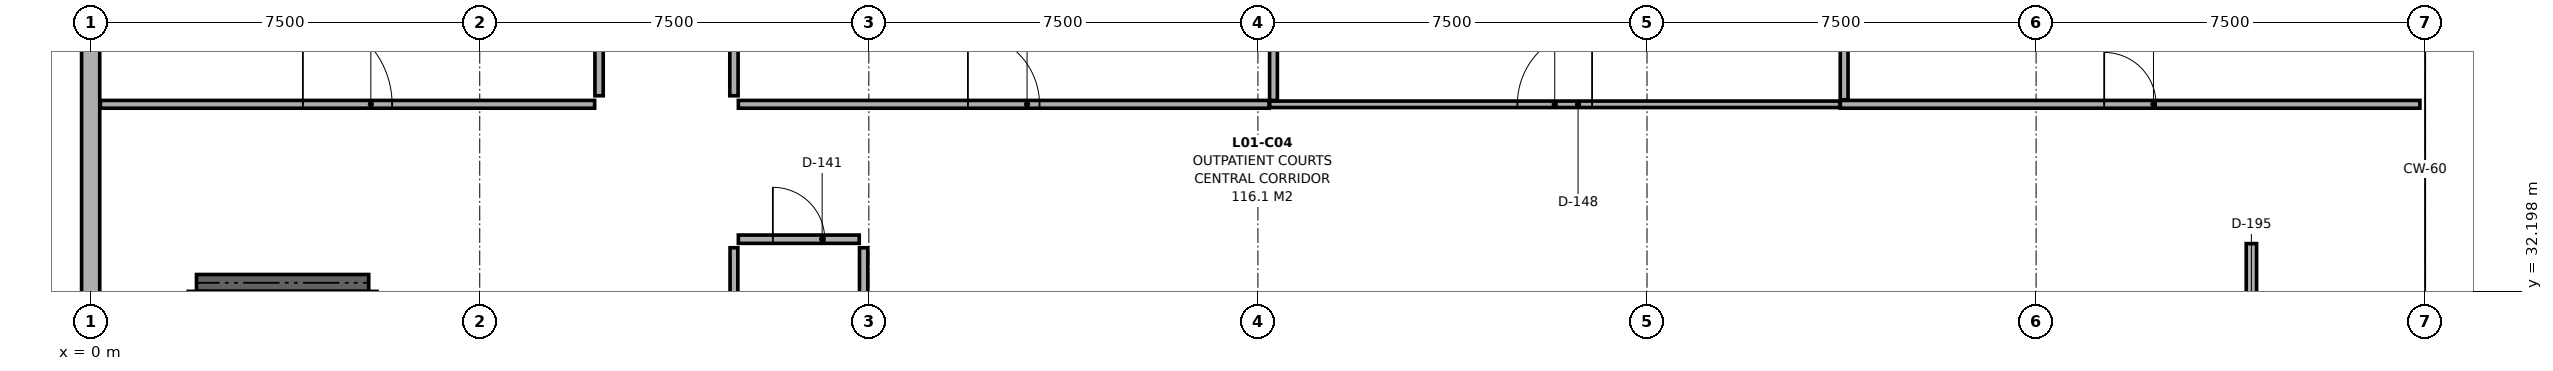
"""IFC4 building model, lengths in metres.
Left out: names, types, materials, properties, quantities, classifications, styles, units other than length and angle.
Written with IfcOpenShell. Run it as: python <this file> out.ifc"""

import sys

from ifc_helpers import new_model, si_unit, direction, frame, frame_2d, origin, place, context, subcontext, project, spatial, rectangle, extrude, element, fill, save


model = new_model("IFC4")
c1 = context("Model", 3, precision=1e-05, world=origin(), true_north=direction((0.0, 1.0)))
c2 = subcontext(c1, "Body", "Model", "MODEL_VIEW")
j1 = project(units=[si_unit("LENGTHUNIT", "METRE"), si_unit("PLANEANGLEUNIT", "RADIAN")], contexts=[c1])
p1 = place(None, origin())
s1 = spatial("IfcSite", under=j1, at=p1, CompositionType="ELEMENT")
p2 = place(p1, origin())
s2 = spatial("IfcBuilding", under=s1, at=p2, CompositionType="ELEMENT")
p3 = place(p2, frame((0.0, 0.0, 5.0)))
s3 = spatial("IfcBuildingStorey", under=s2, at=p3, CompositionType="ELEMENT", Elevation=5.0)
p4 = place(p3, frame((0.0, 31.15, 0.0), z_axis=(0.0, 0.0, 1.0), x_axis=(0.0, 1.0, 0.0)))
e1 = element("IfcWall", 1, at=p4, inside=s3, PredefinedType="SOLIDWALL", context=c2, shape_type="SweptSolid", body=[
    extrude(rectangle(XDim=6.8, YDim=0.35, at=frame_2d((3.4, 0.0))), origin(), (0.0, 0.0, 1.0), 3.535),
])
p5 = place(p3, frame((5.36, 32.36, 0.0), z_axis=(0.0, 0.0, 1.0), x_axis=(-1.0, 0.0, 0.0)))
e2 = element("IfcWall", 2, at=p5, inside=s3, PredefinedType="SHEAR", context=c2, shape_type="SweptSolid", body=[
    extrude(rectangle(XDim=3.32, YDim=0.32, at=frame_2d((1.66, 0.0))), origin(), (0.0, 0.0, 1.0), 4.2),
])
p6 = place(p3, frame((0.187, 35.8, 0.0), z_axis=(0.0, 0.0, 1.0), x_axis=(1.0, 0.0, 0.0)))
e3 = element("IfcWall", 3, at=p6, inside=s3, PredefinedType="PARTITIONING", context=c2, shape_type="SweptSolid", body=[
    extrude(rectangle(XDim=9.528, YDim=0.15, at=frame_2d((4.764, 0.0))), origin(), (0.0, 0.0, 1.0), 3.265),
])
p7 = place(p6, frame((3.904, 0.0, 0.0)))
e4 = element("IfcOpeningElement", 4, at=p7, cuts=e3, PredefinedType="OPENING", context=c2, shape_type="SweptSolid", body=[
    extrude(rectangle(XDim=1.72, YDim=2.34, at=frame_2d((0.86, 1.17))), frame((0.0, 0.087, 0.0), z_axis=(0.0, -1.0, 0.0), x_axis=(1.0, 0.0, 0.0)), (0.0, 0.0, 1.0), 0.174),
])
p8 = place(p3, frame((12.485, 35.8, 0.0), z_axis=(0.0, 0.0, 1.0), x_axis=(1.0, 0.0, 0.0)))
e5 = element("IfcWall", 5, at=p8, inside=s3, PredefinedType="PARTITIONING", context=c2, shape_type="SweptSolid", body=[
    extrude(rectangle(XDim=10.23, YDim=0.15, at=frame_2d((5.115, 0.0))), origin(), (0.0, 0.0, 1.0), 3.265),
])
p9 = place(p8, frame((4.425, 0.0, 0.0)))
e6 = element("IfcOpeningElement", 6, at=p9, cuts=e5, PredefinedType="OPENING", context=c2, shape_type="SweptSolid", body=[
    extrude(rectangle(XDim=1.38, YDim=2.3, at=frame_2d((0.69, 1.15))), frame((0.0, 0.087, 0.0), z_axis=(0.0, -1.0, 0.0), x_axis=(1.0, 0.0, 0.0)), (0.0, 0.0, 1.0), 0.174),
])
p10 = place(p3, frame((22.727, 35.8, 0.0), z_axis=(0.0, 0.0, 1.0), x_axis=(1.0, 0.0, 0.0)))
e7 = element("IfcWall", 7, at=p10, inside=s3, PredefinedType="PARTITIONING", context=c2, shape_type="SweptSolid", body=[
    extrude(rectangle(XDim=10.988, YDim=0.125, at=frame_2d((5.494, 0.0))), origin(), (0.0, 0.0, 1.0), 3.265),
])
p11 = place(p10, frame((4.774, 0.0, 0.0)))
e8 = element("IfcOpeningElement", 8, at=p11, cuts=e7, PredefinedType="OPENING", context=c2, shape_type="SweptSolid", body=[
    extrude(rectangle(XDim=1.44, YDim=2.32, at=frame_2d((0.72, 1.16))), frame((0.0, 0.074, 0.0), z_axis=(0.0, -1.0, 0.0), x_axis=(1.0, 0.0, 0.0)), (0.0, 0.0, 1.0), 0.149),
])
p12 = place(p3, frame((33.727, 35.8, 0.0), z_axis=(0.0, 0.0, 1.0), x_axis=(1.0, 0.0, 0.0)))
e9 = element("IfcWall", 9, at=p12, inside=s3, PredefinedType="PARTITIONING", context=c2, shape_type="SweptSolid", body=[
    extrude(rectangle(XDim=11.171, YDim=0.15, at=frame_2d((5.585, 0.0))), origin(), (0.0, 0.0, 1.0), 3.485),
])
p13 = place(p12, frame((5.085, 0.0, 0.0)))
e10 = element("IfcOpeningElement", 10, at=p13, cuts=e9, PredefinedType="OPENING", context=c2, shape_type="SweptSolid", body=[
    extrude(rectangle(XDim=1.0, YDim=2.15, at=frame_2d((0.5, 1.075))), frame((0.0, 0.087, 0.0), z_axis=(0.0, -1.0, 0.0), x_axis=(1.0, 0.0, 0.0)), (0.0, 0.0, 1.0), 0.174),
])
p14 = place(p3, frame((12.485, 33.2, 0.0), z_axis=(0.0, 0.0, 1.0), x_axis=(1.0, 0.0, 0.0)))
e11 = element("IfcWall", 11, at=p14, inside=s3, PredefinedType="PARTITIONING", context=c2, shape_type="SweptSolid", body=[
    extrude(rectangle(XDim=2.33, YDim=0.16, at=frame_2d((1.165, 0.0))), origin(), (0.0, 0.0, 1.0), 3.265),
])
p15 = place(p14, frame((0.665, 0.0, 0.0)))
e12 = element("IfcOpeningElement", 12, at=p15, cuts=e11, PredefinedType="OPENING", context=c2, shape_type="SweptSolid", body=[
    extrude(rectangle(XDim=1.0, YDim=2.22, at=frame_2d((0.5, 1.11))), frame((0.0, 0.092, 0.0), z_axis=(0.0, -1.0, 0.0), x_axis=(1.0, 0.0, 0.0)), (0.0, 0.0, 1.0), 0.184),
])
p16 = place(p3, frame((41.65, 27.735, 0.0), z_axis=(0.0, 0.0, 1.0), x_axis=(0.0, 1.0, 0.0)))
e13 = element("IfcWall", 13, at=p16, inside=s3, PredefinedType="PARTITIONING", context=c2, shape_type="SweptSolid", body=[
    extrude(rectangle(XDim=5.38, YDim=0.2, at=frame_2d((2.69, 0.0))), origin(), (0.0, 0.0, 1.0), 3.485),
])
p17 = place(p16, frame((1.79, 0.0, 0.0)))
e14 = element("IfcOpeningElement", 14, at=p17, cuts=e13, PredefinedType="OPENING", context=c2, shape_type="SweptSolid", body=[
    extrude(rectangle(XDim=1.8, YDim=2.15, at=frame_2d((0.9, 1.075))), frame((0.0, 0.112, 0.0), z_axis=(0.0, -1.0, 0.0), x_axis=(1.0, 0.0, 0.0)), (0.0, 0.0, 1.0), 0.224),
])
p18 = place(p3, frame((9.8, 35.965, 0.0), z_axis=(0.0, 0.0, 1.0), x_axis=(0.0, 1.0, 0.0)))
e15 = element("IfcWall", 15, at=p18, inside=s3, PredefinedType="PARTITIONING", context=c2, shape_type="SweptSolid", body=[
    extrude(rectangle(XDim=9.908, YDim=0.16, at=frame_2d((4.954, 0.0))), origin(), (0.0, 0.0, 1.0), 3.265),
])
p19 = place(p3, frame((12.4, 35.965, 0.0), z_axis=(0.0, 0.0, 1.0), x_axis=(0.0, 1.0, 0.0)))
e16 = element("IfcWall", 16, at=p19, inside=s3, PredefinedType="PARTITIONING", context=c2, shape_type="SweptSolid", body=[
    extrude(rectangle(XDim=9.59, YDim=0.16, at=frame_2d((4.795, 0.0))), origin(), (0.0, 0.0, 1.0), 3.265),
])
p20 = place(p3, frame((22.8, 35.875, 0.0), z_axis=(0.0, 0.0, 1.0), x_axis=(0.0, 1.0, 0.0)))
e17 = element("IfcWall", 17, at=p20, inside=s3, PredefinedType="PARTITIONING", context=c2, shape_type="SweptSolid", body=[
    extrude(rectangle(XDim=9.588, YDim=0.15, at=frame_2d((4.794, 0.0))), origin(), (0.0, 0.0, 1.0), 3.265),
])
p21 = place(p3, frame((33.8, 35.887, 0.0), z_axis=(0.0, 0.0, 1.0), x_axis=(0.0, 1.0, 0.0)))
e18 = element("IfcWall", 18, at=p21, inside=s3, PredefinedType="PARTITIONING", context=c2, shape_type="SweptSolid", body=[
    extrude(rectangle(XDim=9.741, YDim=0.15, at=frame_2d((4.871, 0.0))), origin(), (0.0, 0.0, 1.0), 3.485),
])
p22 = place(p3, frame((12.4, 15.965, 0.0), z_axis=(0.0, 0.0, 1.0), x_axis=(0.0, 1.0, 0.0)))
e19 = element("IfcWall", 19, at=p22, inside=s3, PredefinedType="PARTITIONING", context=c2, shape_type="SweptSolid", body=[
    extrude(rectangle(XDim=17.07, YDim=0.15, at=frame_2d((8.535, 0.0))), origin(), (0.0, 0.0, 1.0), 3.265),
])
p23 = place(p3, frame((14.9, 16.132, 0.0), z_axis=(0.0, 0.0, 1.0), x_axis=(0.0, 1.0, 0.0)))
e20 = element("IfcWall", 20, at=p23, inside=s3, PredefinedType="PARTITIONING", context=c2, shape_type="SweptSolid", body=[
    extrude(rectangle(XDim=16.903, YDim=0.16, at=frame_2d((8.451, 0.0))), origin(), (0.0, 0.0, 1.0), 3.265),
])
p24 = place(p7, origin())
e21 = element("IfcDoor", 21, at=p24, inside=s3, OperationType="SINGLE_SWING_LEFT", PredefinedType="DOOR", context=c2, shape_type="SweptSolid", body=[
    extrude(rectangle(XDim=1.72, YDim=2.34, at=frame_2d((0.86, 1.17))), frame((0.0, 0.025, 0.0), z_axis=(0.0, -1.0, 0.0), x_axis=(1.0, 0.0, 0.0)), (0.0, 0.0, 1.0), 0.05),
])
fill(e4, e21)
p25 = place(p9, origin())
e22 = element("IfcDoor", 22, at=p25, inside=s3, OperationType="SINGLE_SWING_LEFT", PredefinedType="DOOR", context=c2, shape_type="SweptSolid", body=[
    extrude(rectangle(XDim=1.38, YDim=2.3, at=frame_2d((0.69, 1.15))), frame((0.0, 0.025, 0.0), z_axis=(0.0, -1.0, 0.0), x_axis=(1.0, 0.0, 0.0)), (0.0, 0.0, 1.0), 0.05),
])
fill(e6, e22)
p26 = place(p11, origin())
e23 = element("IfcDoor", 23, at=p26, inside=s3, OperationType="SINGLE_SWING_RIGHT", PredefinedType="DOOR", context=c2, shape_type="SweptSolid", body=[
    extrude(rectangle(XDim=1.44, YDim=2.32, at=frame_2d((0.72, 1.16))), frame((0.0, 0.025, 0.0), z_axis=(0.0, -1.0, 0.0), x_axis=(1.0, 0.0, 0.0)), (0.0, 0.0, 1.0), 0.05),
])
fill(e8, e23)
p27 = place(p13, origin())
e24 = element("IfcDoor", 24, at=p27, inside=s3, OperationType="SINGLE_SWING_LEFT", PredefinedType="DOOR", context=c2, shape_type="SweptSolid", body=[
    extrude(rectangle(XDim=1.0, YDim=2.15, at=frame_2d((0.5, 1.075))), frame((0.0, 0.025, 0.0), z_axis=(0.0, -1.0, 0.0), x_axis=(1.0, 0.0, 0.0)), (0.0, 0.0, 1.0), 0.05),
])
fill(e10, e24)
p28 = place(p15, origin())
e25 = element("IfcDoor", 25, at=p28, inside=s3, OperationType="SINGLE_SWING_LEFT", PredefinedType="DOOR", context=c2, shape_type="SweptSolid", body=[
    extrude(rectangle(XDim=1.0, YDim=2.22, at=frame_2d((0.5, 1.11))), frame((0.0, 0.025, 0.0), z_axis=(0.0, -1.0, 0.0), x_axis=(1.0, 0.0, 0.0)), (0.0, 0.0, 1.0), 0.05),
])
fill(e12, e25)
save(model, sys.argv[1])
